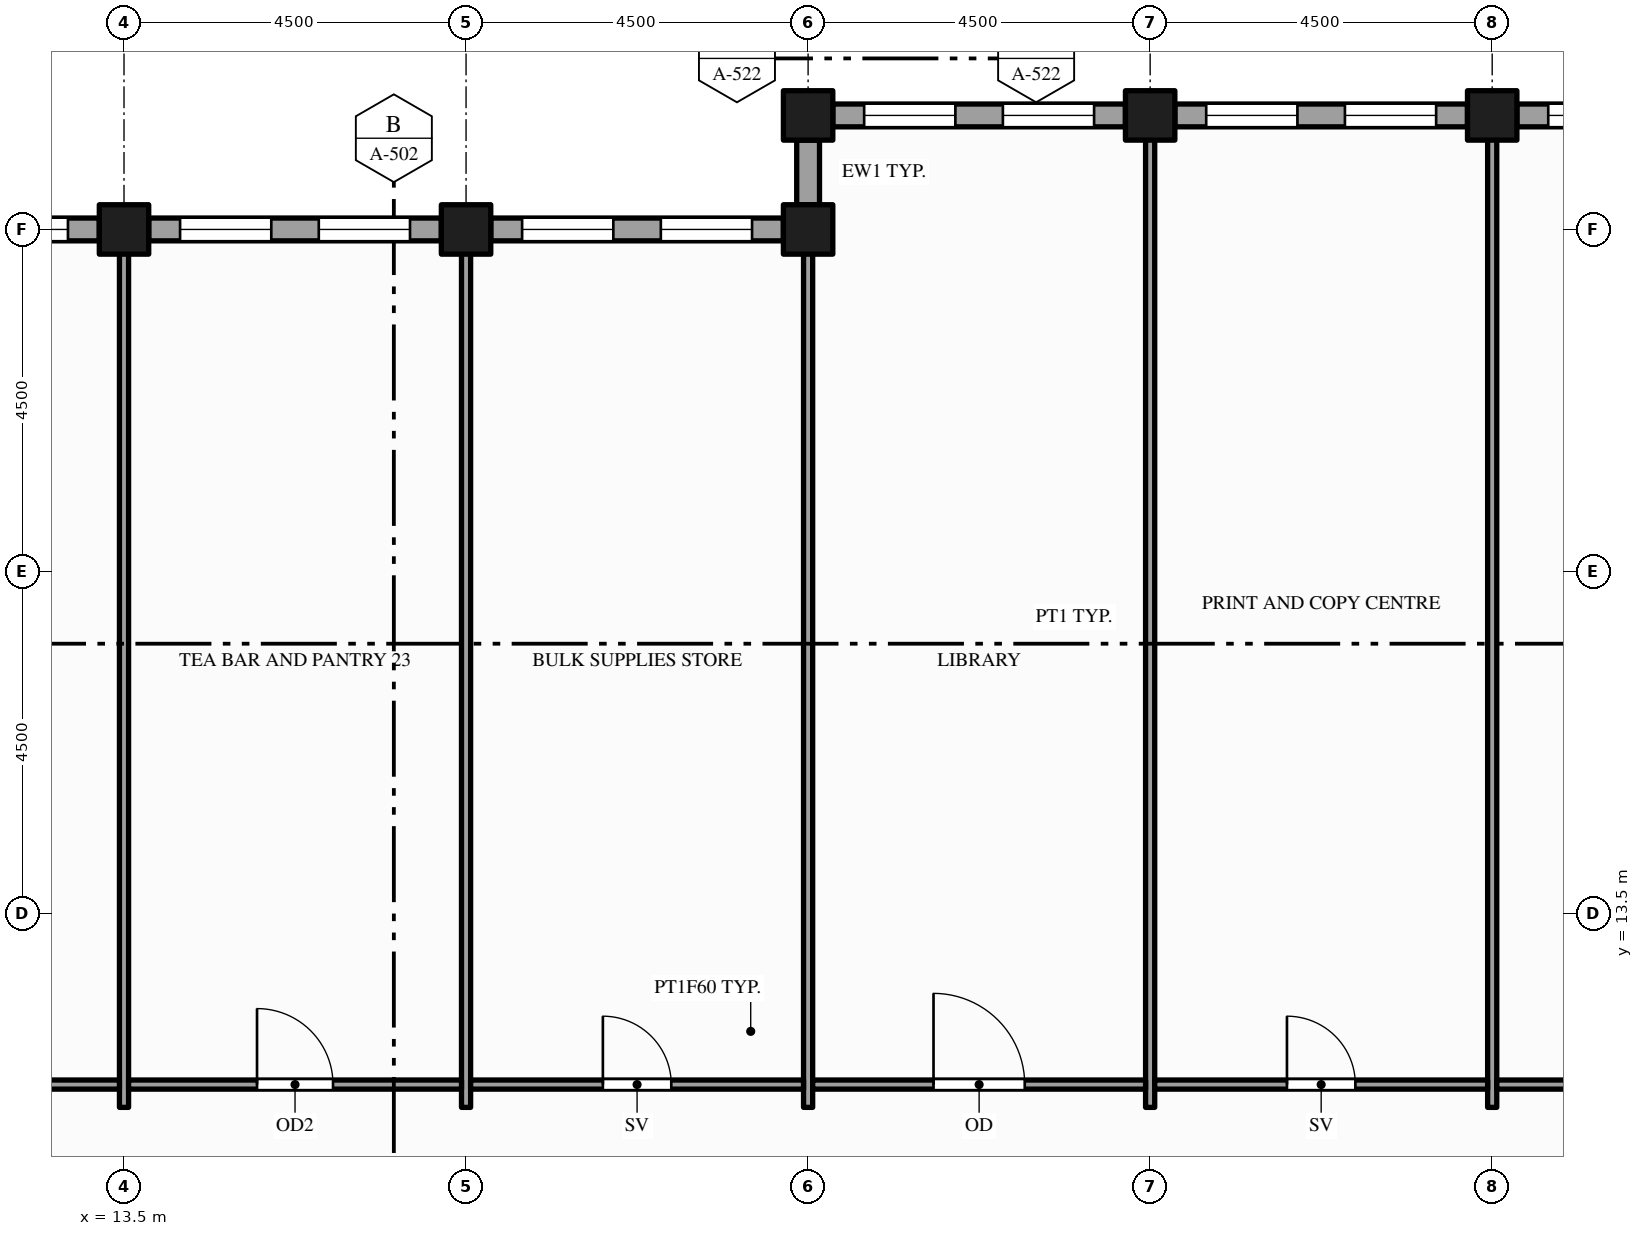
"""IFC4 building model, lengths in metres.
Left out: names, types, materials, properties, quantities, classifications, styles, units other than length and angle.
Written with IfcOpenShell. Run it as: python <this file> out.ifc"""

import sys

from ifc_helpers import new_model, si_unit, direction, frame, frame_2d, origin, origin_2d, place, context, subcontext, project, spatial, rectangle, hollow_rectangle, extrude, element, fill, save


model = new_model("IFC4")
c1 = context("Model", 3, precision=1e-05, world=origin(), true_north=direction((0.0, 1.0)))
c2 = subcontext(c1, "Body", "Model", "MODEL_VIEW")
j1 = project(units=[si_unit("LENGTHUNIT", "METRE"), si_unit("PLANEANGLEUNIT", "RADIAN")], contexts=[c1])
p1 = place(None, origin())
s1 = spatial("IfcSite", under=j1, at=p1, CompositionType="ELEMENT")
p2 = place(p1, origin())
s2 = spatial("IfcBuilding", under=s1, at=p2, CompositionType="ELEMENT")
p3 = place(p2, frame((0.0, 0.0, 289.0)))
s3 = spatial("IfcBuildingStorey", under=s2, at=p3, CompositionType="ELEMENT", Elevation=289.0)
for number, where, z_axis, x_axis in (
    (1, (13.5, 22.5, -0.15), (0.0, 0.0, 1.0), (1.0, 0.0, 0.0)),
    (2, (18.0, 22.5, -0.15), (0.0, 0.0, 1.0), (1.0, 0.0, 0.0)),
    (3, (22.5, 22.5, -0.15), (0.0, 0.0, 1.0), (1.0, 0.0, 0.0)),
    (4, (22.5, 24.0, -0.15), (0.0, 0.0, 1.0), (1.0, 0.0, 0.0)),
    (5, (27.0, 24.0, -0.15), (0.0, 0.0, 1.0), (1.0, 0.0, 0.0)),
    (6, (31.5, 24.0, -0.15), (0.0, 0.0, 1.0), (1.0, 0.0, 0.0)),
):
    element("IfcColumn", number, at=place(p3, frame(where, z_axis=z_axis, x_axis=x_axis)), inside=s3, PredefinedType="COLUMN", context=c2, shape_type="SweptSolid", body=[
        extrude(hollow_rectangle(XDim=0.65, YDim=0.65, WallThickness=0.032, at=origin_2d()), origin(), (0.0, 0.0, 1.0), 4.0),
    ])
p4 = place(p3, frame((35.675, 24.0, 0.0), z_axis=(0.0, 0.0, 1.0), x_axis=(-1.0, 0.0, 0.0)))
e7 = element("IfcWall", 7, at=p4, inside=s3, PredefinedType="STANDARD", context=c2, shape_type="SweptSolid", body=[
    extrude(rectangle(XDim=3.85, YDim=0.3, at=frame_2d((1.925, 0.0))), origin(), (0.0, 0.0, 1.0), 2.87),
])
p5 = place(p4, frame((0.413, 0.0, 0.9)))
e8 = element("IfcOpeningElement", 8, at=p5, cuts=e7, PredefinedType="OPENING", context=c2, shape_type="SweptSolid", body=[
    extrude(rectangle(XDim=1.2, YDim=1.75, at=frame_2d((0.6, 0.875))), frame((0.0, 0.16, 0.0), z_axis=(0.0, -1.0, 0.0), x_axis=(1.0, 0.0, 0.0)), (0.0, 0.0, 1.0), 0.32),
])
p6 = place(p4, frame((2.238, 0.0, 0.9)))
e9 = element("IfcOpeningElement", 9, at=p6, cuts=e7, PredefinedType="OPENING", context=c2, shape_type="SweptSolid", body=[
    extrude(rectangle(XDim=1.2, YDim=1.75, at=frame_2d((0.6, 0.875))), frame((0.0, 0.16, 0.0), z_axis=(0.0, -1.0, 0.0), x_axis=(1.0, 0.0, 0.0)), (0.0, 0.0, 1.0), 0.32),
])
p7 = place(p3, frame((31.175, 24.0, 0.0), z_axis=(0.0, 0.0, 1.0), x_axis=(-1.0, 0.0, 0.0)))
e10 = element("IfcWall", 10, at=p7, inside=s3, PredefinedType="STANDARD", context=c2, shape_type="SweptSolid", body=[
    extrude(rectangle(XDim=3.85, YDim=0.3, at=frame_2d((1.925, 0.0))), origin(), (0.0, 0.0, 1.0), 2.87),
])
p8 = place(p7, frame((0.413, 0.0, 0.9)))
e11 = element("IfcOpeningElement", 11, at=p8, cuts=e10, PredefinedType="OPENING", context=c2, shape_type="SweptSolid", body=[
    extrude(rectangle(XDim=1.2, YDim=1.75, at=frame_2d((0.6, 0.875))), frame((0.0, 0.16, 0.0), z_axis=(0.0, -1.0, 0.0), x_axis=(1.0, 0.0, 0.0)), (0.0, 0.0, 1.0), 0.32),
])
p9 = place(p7, frame((2.238, 0.0, 0.9)))
e12 = element("IfcOpeningElement", 12, at=p9, cuts=e10, PredefinedType="OPENING", context=c2, shape_type="SweptSolid", body=[
    extrude(rectangle(XDim=1.2, YDim=1.75, at=frame_2d((0.6, 0.875))), frame((0.0, 0.16, 0.0), z_axis=(0.0, -1.0, 0.0), x_axis=(1.0, 0.0, 0.0)), (0.0, 0.0, 1.0), 0.32),
])
p10 = place(p3, frame((26.675, 24.0, 0.0), z_axis=(0.0, 0.0, 1.0), x_axis=(-1.0, 0.0, 0.0)))
e13 = element("IfcWall", 13, at=p10, inside=s3, PredefinedType="STANDARD", context=c2, shape_type="SweptSolid", body=[
    extrude(rectangle(XDim=3.85, YDim=0.3, at=frame_2d((1.925, 0.0))), origin(), (0.0, 0.0, 1.0), 2.87),
])
p11 = place(p10, frame((0.413, 0.0, 0.9)))
e14 = element("IfcOpeningElement", 14, at=p11, cuts=e13, PredefinedType="OPENING", context=c2, shape_type="SweptSolid", body=[
    extrude(rectangle(XDim=1.2, YDim=1.75, at=frame_2d((0.6, 0.875))), frame((0.0, 0.16, 0.0), z_axis=(0.0, -1.0, 0.0), x_axis=(1.0, 0.0, 0.0)), (0.0, 0.0, 1.0), 0.32),
])
p12 = place(p10, frame((2.238, 0.0, 0.9)))
e15 = element("IfcOpeningElement", 15, at=p12, cuts=e13, PredefinedType="OPENING", context=c2, shape_type="SweptSolid", body=[
    extrude(rectangle(XDim=1.2, YDim=1.75, at=frame_2d((0.6, 0.875))), frame((0.0, 0.16, 0.0), z_axis=(0.0, -1.0, 0.0), x_axis=(1.0, 0.0, 0.0)), (0.0, 0.0, 1.0), 0.32),
])
p13 = place(p3, frame((22.5, 23.675, 0.0), z_axis=(0.0, 0.0, 1.0), x_axis=(0.0, -1.0, 0.0)))
e16 = element("IfcWall", 16, at=p13, inside=s3, PredefinedType="STANDARD", context=c2, shape_type="SweptSolid", body=[
    extrude(rectangle(XDim=0.85, YDim=0.3, at=frame_2d((0.425, 0.0))), origin(), (0.0, 0.0, 1.0), 3.162),
])
p14 = place(p3, frame((22.175, 22.5, 0.0), z_axis=(0.0, 0.0, 1.0), x_axis=(-1.0, 0.0, 0.0)))
e17 = element("IfcWall", 17, at=p14, inside=s3, PredefinedType="STANDARD", context=c2, shape_type="SweptSolid", body=[
    extrude(rectangle(XDim=3.85, YDim=0.3, at=frame_2d((1.925, 0.0))), origin(), (0.0, 0.0, 1.0), 2.87),
])
p15 = place(p14, frame((0.413, 0.0, 0.9)))
e18 = element("IfcOpeningElement", 18, at=p15, cuts=e17, PredefinedType="OPENING", context=c2, shape_type="SweptSolid", body=[
    extrude(rectangle(XDim=1.2, YDim=1.75, at=frame_2d((0.6, 0.875))), frame((0.0, 0.16, 0.0), z_axis=(0.0, -1.0, 0.0), x_axis=(1.0, 0.0, 0.0)), (0.0, 0.0, 1.0), 0.32),
])
p16 = place(p14, frame((2.238, 0.0, 0.9)))
e19 = element("IfcOpeningElement", 19, at=p16, cuts=e17, PredefinedType="OPENING", context=c2, shape_type="SweptSolid", body=[
    extrude(rectangle(XDim=1.2, YDim=1.75, at=frame_2d((0.6, 0.875))), frame((0.0, 0.16, 0.0), z_axis=(0.0, -1.0, 0.0), x_axis=(1.0, 0.0, 0.0)), (0.0, 0.0, 1.0), 0.32),
])
p17 = place(p3, frame((17.675, 22.5, 0.0), z_axis=(0.0, 0.0, 1.0), x_axis=(-1.0, 0.0, 0.0)))
e20 = element("IfcWall", 20, at=p17, inside=s3, PredefinedType="STANDARD", context=c2, shape_type="SweptSolid", body=[
    extrude(rectangle(XDim=3.85, YDim=0.3, at=frame_2d((1.925, 0.0))), origin(), (0.0, 0.0, 1.0), 2.87),
])
p18 = place(p17, frame((0.413, 0.0, 0.9)))
e21 = element("IfcOpeningElement", 21, at=p18, cuts=e20, PredefinedType="OPENING", context=c2, shape_type="SweptSolid", body=[
    extrude(rectangle(XDim=1.2, YDim=1.75, at=frame_2d((0.6, 0.875))), frame((0.0, 0.16, 0.0), z_axis=(0.0, -1.0, 0.0), x_axis=(1.0, 0.0, 0.0)), (0.0, 0.0, 1.0), 0.32),
])
p19 = place(p17, frame((2.238, 0.0, 0.9)))
e22 = element("IfcOpeningElement", 22, at=p19, cuts=e20, PredefinedType="OPENING", context=c2, shape_type="SweptSolid", body=[
    extrude(rectangle(XDim=1.2, YDim=1.75, at=frame_2d((0.6, 0.875))), frame((0.0, 0.16, 0.0), z_axis=(0.0, -1.0, 0.0), x_axis=(1.0, 0.0, 0.0)), (0.0, 0.0, 1.0), 0.32),
])
p20 = place(p3, frame((13.175, 22.5, 0.0), z_axis=(0.0, 0.0, 1.0), x_axis=(-1.0, 0.0, 0.0)))
e23 = element("IfcWall", 23, at=p20, inside=s3, PredefinedType="STANDARD", context=c2, shape_type="SweptSolid", body=[
    extrude(rectangle(XDim=3.85, YDim=0.3, at=frame_2d((1.925, 0.0))), origin(), (0.0, 0.0, 1.0), 2.87),
])
p21 = place(p20, frame((0.413, 0.0, 0.9)))
e24 = element("IfcOpeningElement", 24, at=p21, cuts=e23, PredefinedType="OPENING", context=c2, shape_type="SweptSolid", body=[
    extrude(rectangle(XDim=1.2, YDim=1.75, at=frame_2d((0.6, 0.875))), frame((0.0, 0.16, 0.0), z_axis=(0.0, -1.0, 0.0), x_axis=(1.0, 0.0, 0.0)), (0.0, 0.0, 1.0), 0.32),
])
p22 = place(p20, frame((2.238, 0.0, 0.9)))
e25 = element("IfcOpeningElement", 25, at=p22, cuts=e23, PredefinedType="OPENING", context=c2, shape_type="SweptSolid", body=[
    extrude(rectangle(XDim=1.2, YDim=1.75, at=frame_2d((0.6, 0.875))), frame((0.0, 0.16, 0.0), z_axis=(0.0, -1.0, 0.0), x_axis=(1.0, 0.0, 0.0)), (0.0, 0.0, 1.0), 0.32),
])
for number, where, z_axis, x_axis in (
    (26, (13.5, 10.95, 0.0), (0.0, 0.0, 1.0), (0.0, 1.0, 0.0)),
    (27, (18.0, 10.95, 0.0), (0.0, 0.0, 1.0), (0.0, 1.0, 0.0)),
    (28, (22.5, 10.95, 0.0), (0.0, 0.0, 1.0), (0.0, 1.0, 0.0)),
):
    element("IfcWall", number, at=place(p3, frame(where, z_axis=z_axis, x_axis=x_axis)), inside=s3, PredefinedType="PARTITIONING", context=c2, shape_type="SweptSolid", body=[
        extrude(rectangle(XDim=11.4, YDim=0.12, at=frame_2d((5.7, 0.0))), origin(), (0.0, 0.0, 1.0), 2.87),
    ])
for number, where, z_axis, x_axis in (
    (29, (27.0, 10.95, 0.0), (0.0, 0.0, 1.0), (0.0, 1.0, 0.0)),
    (30, (31.5, 10.95, 0.0), (0.0, 0.0, 1.0), (0.0, 1.0, 0.0)),
):
    element("IfcWall", number, at=place(p3, frame(where, z_axis=z_axis, x_axis=x_axis)), inside=s3, PredefinedType="PARTITIONING", context=c2, shape_type="SweptSolid", body=[
        extrude(rectangle(XDim=12.9, YDim=0.12, at=frame_2d((6.45, 0.0))), origin(), (0.0, 0.0, 1.0), 2.87),
    ])
p23 = place(p3, frame((0.15, 11.25, 0.0), z_axis=(0.0, 0.0, 1.0), x_axis=(1.0, 0.0, 0.0)))
e31 = element("IfcWall", 31, at=p23, inside=s3, PredefinedType="PARTITIONING", context=c2, shape_type="SweptSolid", body=[
    extrude(rectangle(XDim=13.29, YDim=0.12, at=frame_2d((6.645, 0.0))), origin(), (0.0, 0.0, 1.0), 2.87),
])
p24 = place(p23, frame((5.755, 0.0, 0.0)))
e32 = element("IfcOpeningElement", 32, at=p24, cuts=e31, PredefinedType="OPENING", context=c2, shape_type="SweptSolid", body=[
    extrude(rectangle(XDim=1.8, YDim=2.1, at=frame_2d((0.9, 1.05))), frame((0.0, 0.07, 0.0), z_axis=(0.0, -1.0, 0.0), x_axis=(1.0, 0.0, 0.0)), (0.0, 0.0, 1.0), 0.14),
])
p25 = place(p3, frame((13.56, 11.25, 0.0), z_axis=(0.0, 0.0, 1.0), x_axis=(1.0, 0.0, 0.0)))
e33 = element("IfcWall", 33, at=p25, inside=s3, PredefinedType="PARTITIONING", context=c2, shape_type="SweptSolid", body=[
    extrude(rectangle(XDim=4.38, YDim=0.12, at=frame_2d((2.19, 0.0))), origin(), (0.0, 0.0, 1.0), 2.87),
])
p26 = place(p25, frame((1.69, 0.0, 0.0)))
e34 = element("IfcOpeningElement", 34, at=p26, cuts=e33, PredefinedType="OPENING", context=c2, shape_type="SweptSolid", body=[
    extrude(rectangle(XDim=1.0, YDim=2.1, at=frame_2d((0.5, 1.05))), frame((0.0, 0.07, 0.0), z_axis=(0.0, -1.0, 0.0), x_axis=(1.0, 0.0, 0.0)), (0.0, 0.0, 1.0), 0.14),
])
p27 = place(p3, frame((18.06, 11.25, 0.0), z_axis=(0.0, 0.0, 1.0), x_axis=(1.0, 0.0, 0.0)))
e35 = element("IfcWall", 35, at=p27, inside=s3, PredefinedType="PARTITIONING", context=c2, shape_type="SweptSolid", body=[
    extrude(rectangle(XDim=4.38, YDim=0.12, at=frame_2d((2.19, 0.0))), origin(), (0.0, 0.0, 1.0), 2.87),
])
p28 = place(p27, frame((1.74, 0.0, 0.0)))
e36 = element("IfcOpeningElement", 36, at=p28, cuts=e35, PredefinedType="OPENING", context=c2, shape_type="SweptSolid", body=[
    extrude(rectangle(XDim=0.9, YDim=2.1, at=frame_2d((0.45, 1.05))), frame((0.0, 0.07, 0.0), z_axis=(0.0, -1.0, 0.0), x_axis=(1.0, 0.0, 0.0)), (0.0, 0.0, 1.0), 0.14),
])
p29 = place(p3, frame((22.56, 11.25, 0.0), z_axis=(0.0, 0.0, 1.0), x_axis=(1.0, 0.0, 0.0)))
e37 = element("IfcWall", 37, at=p29, inside=s3, PredefinedType="PARTITIONING", context=c2, shape_type="SweptSolid", body=[
    extrude(rectangle(XDim=4.38, YDim=0.12, at=frame_2d((2.19, 0.0))), origin(), (0.0, 0.0, 1.0), 2.87),
])
p30 = place(p29, frame((1.59, 0.0, 0.0)))
e38 = element("IfcOpeningElement", 38, at=p30, cuts=e37, PredefinedType="OPENING", context=c2, shape_type="SweptSolid", body=[
    extrude(rectangle(XDim=1.2, YDim=2.1, at=frame_2d((0.6, 1.05))), frame((0.0, 0.07, 0.0), z_axis=(0.0, -1.0, 0.0), x_axis=(1.0, 0.0, 0.0)), (0.0, 0.0, 1.0), 0.14),
])
p31 = place(p3, frame((27.06, 11.25, 0.0), z_axis=(0.0, 0.0, 1.0), x_axis=(1.0, 0.0, 0.0)))
e39 = element("IfcWall", 39, at=p31, inside=s3, PredefinedType="PARTITIONING", context=c2, shape_type="SweptSolid", body=[
    extrude(rectangle(XDim=4.38, YDim=0.12, at=frame_2d((2.19, 0.0))), origin(), (0.0, 0.0, 1.0), 2.87),
])
p32 = place(p31, frame((1.74, 0.0, 0.0)))
e40 = element("IfcOpeningElement", 40, at=p32, cuts=e39, PredefinedType="OPENING", context=c2, shape_type="SweptSolid", body=[
    extrude(rectangle(XDim=0.9, YDim=2.1, at=frame_2d((0.45, 1.05))), frame((0.0, 0.07, 0.0), z_axis=(0.0, -1.0, 0.0), x_axis=(1.0, 0.0, 0.0)), (0.0, 0.0, 1.0), 0.14),
])
p33 = place(p3, frame((31.56, 11.25, 0.0), z_axis=(0.0, 0.0, 1.0), x_axis=(1.0, 0.0, 0.0)))
e41 = element("IfcWall", 41, at=p33, inside=s3, PredefinedType="PARTITIONING", context=c2, shape_type="SweptSolid", body=[
    extrude(rectangle(XDim=15.63, YDim=0.12, at=frame_2d((7.815, 0.0))), origin(), (0.0, 0.0, 1.0), 2.87),
])
p34 = place(p33, frame((7.315, 0.0, 0.0)))
e42 = element("IfcOpeningElement", 42, at=p34, cuts=e41, PredefinedType="OPENING", context=c2, shape_type="SweptSolid", body=[
    extrude(rectangle(XDim=1.0, YDim=2.1, at=frame_2d((0.5, 1.05))), frame((0.0, 0.07, 0.0), z_axis=(0.0, -1.0, 0.0), x_axis=(1.0, 0.0, 0.0)), (0.0, 0.0, 1.0), 0.14),
])
p35 = place(p6, origin())
e43 = element("IfcWindow", 43, at=p35, inside=s3, PartitioningType="SINGLE_PANEL", PredefinedType="WINDOW", context=c2, shape_type="SweptSolid", body=[
    extrude(rectangle(XDim=1.2, YDim=1.75, at=frame_2d((0.6, 0.875))), frame((0.0, 0.03, 0.0), z_axis=(0.0, -1.0, 0.0), x_axis=(1.0, 0.0, 0.0)), (0.0, 0.0, 1.0), 0.06),
])
fill(e9, e43)
p36 = place(p8, origin())
e44 = element("IfcWindow", 44, at=p36, inside=s3, PartitioningType="SINGLE_PANEL", PredefinedType="WINDOW", context=c2, shape_type="SweptSolid", body=[
    extrude(rectangle(XDim=1.2, YDim=1.75, at=frame_2d((0.6, 0.875))), frame((0.0, 0.03, 0.0), z_axis=(0.0, -1.0, 0.0), x_axis=(1.0, 0.0, 0.0)), (0.0, 0.0, 1.0), 0.06),
])
fill(e11, e44)
p37 = place(p9, origin())
e45 = element("IfcWindow", 45, at=p37, inside=s3, PartitioningType="SINGLE_PANEL", PredefinedType="WINDOW", context=c2, shape_type="SweptSolid", body=[
    extrude(rectangle(XDim=1.2, YDim=1.75, at=frame_2d((0.6, 0.875))), frame((0.0, 0.03, 0.0), z_axis=(0.0, -1.0, 0.0), x_axis=(1.0, 0.0, 0.0)), (0.0, 0.0, 1.0), 0.06),
])
fill(e12, e45)
p38 = place(p11, origin())
e46 = element("IfcWindow", 46, at=p38, inside=s3, PartitioningType="SINGLE_PANEL", PredefinedType="WINDOW", context=c2, shape_type="SweptSolid", body=[
    extrude(rectangle(XDim=1.2, YDim=1.75, at=frame_2d((0.6, 0.875))), frame((0.0, 0.03, 0.0), z_axis=(0.0, -1.0, 0.0), x_axis=(1.0, 0.0, 0.0)), (0.0, 0.0, 1.0), 0.06),
])
fill(e14, e46)
p39 = place(p12, origin())
e47 = element("IfcWindow", 47, at=p39, inside=s3, PartitioningType="SINGLE_PANEL", PredefinedType="WINDOW", context=c2, shape_type="SweptSolid", body=[
    extrude(rectangle(XDim=1.2, YDim=1.75, at=frame_2d((0.6, 0.875))), frame((0.0, 0.03, 0.0), z_axis=(0.0, -1.0, 0.0), x_axis=(1.0, 0.0, 0.0)), (0.0, 0.0, 1.0), 0.06),
])
fill(e15, e47)
p40 = place(p15, origin())
e48 = element("IfcWindow", 48, at=p40, inside=s3, PartitioningType="SINGLE_PANEL", PredefinedType="WINDOW", context=c2, shape_type="SweptSolid", body=[
    extrude(rectangle(XDim=1.2, YDim=1.75, at=frame_2d((0.6, 0.875))), frame((0.0, 0.03, 0.0), z_axis=(0.0, -1.0, 0.0), x_axis=(1.0, 0.0, 0.0)), (0.0, 0.0, 1.0), 0.06),
])
fill(e18, e48)
p41 = place(p16, origin())
e49 = element("IfcWindow", 49, at=p41, inside=s3, PartitioningType="SINGLE_PANEL", PredefinedType="WINDOW", context=c2, shape_type="SweptSolid", body=[
    extrude(rectangle(XDim=1.2, YDim=1.75, at=frame_2d((0.6, 0.875))), frame((0.0, 0.03, 0.0), z_axis=(0.0, -1.0, 0.0), x_axis=(1.0, 0.0, 0.0)), (0.0, 0.0, 1.0), 0.06),
])
fill(e19, e49)
p42 = place(p18, origin())
e50 = element("IfcWindow", 50, at=p42, inside=s3, PartitioningType="SINGLE_PANEL", PredefinedType="WINDOW", context=c2, shape_type="SweptSolid", body=[
    extrude(rectangle(XDim=1.2, YDim=1.75, at=frame_2d((0.6, 0.875))), frame((0.0, 0.03, 0.0), z_axis=(0.0, -1.0, 0.0), x_axis=(1.0, 0.0, 0.0)), (0.0, 0.0, 1.0), 0.06),
])
fill(e21, e50)
p43 = place(p19, origin())
e51 = element("IfcWindow", 51, at=p43, inside=s3, PartitioningType="SINGLE_PANEL", PredefinedType="WINDOW", context=c2, shape_type="SweptSolid", body=[
    extrude(rectangle(XDim=1.2, YDim=1.75, at=frame_2d((0.6, 0.875))), frame((0.0, 0.03, 0.0), z_axis=(0.0, -1.0, 0.0), x_axis=(1.0, 0.0, 0.0)), (0.0, 0.0, 1.0), 0.06),
])
fill(e22, e51)
p44 = place(p21, origin())
e52 = element("IfcWindow", 52, at=p44, inside=s3, PartitioningType="SINGLE_PANEL", PredefinedType="WINDOW", context=c2, shape_type="SweptSolid", body=[
    extrude(rectangle(XDim=1.2, YDim=1.75, at=frame_2d((0.6, 0.875))), frame((0.0, 0.03, 0.0), z_axis=(0.0, -1.0, 0.0), x_axis=(1.0, 0.0, 0.0)), (0.0, 0.0, 1.0), 0.06),
])
fill(e24, e52)
p45 = place(p26, origin())
e53 = element("IfcDoor", 53, at=p45, inside=s3, OperationType="SINGLE_SWING_LEFT", PredefinedType="DOOR", context=c2, shape_type="SweptSolid", body=[
    extrude(rectangle(XDim=1.0, YDim=2.1, at=frame_2d((0.5, 1.05))), frame((0.0, 0.025, 0.0), z_axis=(0.0, -1.0, 0.0), x_axis=(1.0, 0.0, 0.0)), (0.0, 0.0, 1.0), 0.05),
])
fill(e34, e53)
p46 = place(p28, origin())
e54 = element("IfcDoor", 54, at=p46, inside=s3, OperationType="SINGLE_SWING_LEFT", PredefinedType="DOOR", context=c2, shape_type="SweptSolid", body=[
    extrude(rectangle(XDim=0.9, YDim=2.1, at=frame_2d((0.45, 1.05))), frame((0.0, 0.025, 0.0), z_axis=(0.0, -1.0, 0.0), x_axis=(1.0, 0.0, 0.0)), (0.0, 0.0, 1.0), 0.05),
])
fill(e36, e54)
p47 = place(p30, origin())
e55 = element("IfcDoor", 55, at=p47, inside=s3, OperationType="SINGLE_SWING_LEFT", PredefinedType="DOOR", context=c2, shape_type="SweptSolid", body=[
    extrude(rectangle(XDim=1.2, YDim=2.1, at=frame_2d((0.6, 1.05))), frame((0.0, 0.025, 0.0), z_axis=(0.0, -1.0, 0.0), x_axis=(1.0, 0.0, 0.0)), (0.0, 0.0, 1.0), 0.05),
])
fill(e38, e55)
p48 = place(p32, origin())
e56 = element("IfcDoor", 56, at=p48, inside=s3, OperationType="SINGLE_SWING_LEFT", PredefinedType="DOOR", context=c2, shape_type="SweptSolid", body=[
    extrude(rectangle(XDim=0.9, YDim=2.1, at=frame_2d((0.45, 1.05))), frame((0.0, 0.025, 0.0), z_axis=(0.0, -1.0, 0.0), x_axis=(1.0, 0.0, 0.0)), (0.0, 0.0, 1.0), 0.05),
])
fill(e40, e56)
save(model, sys.argv[1])
